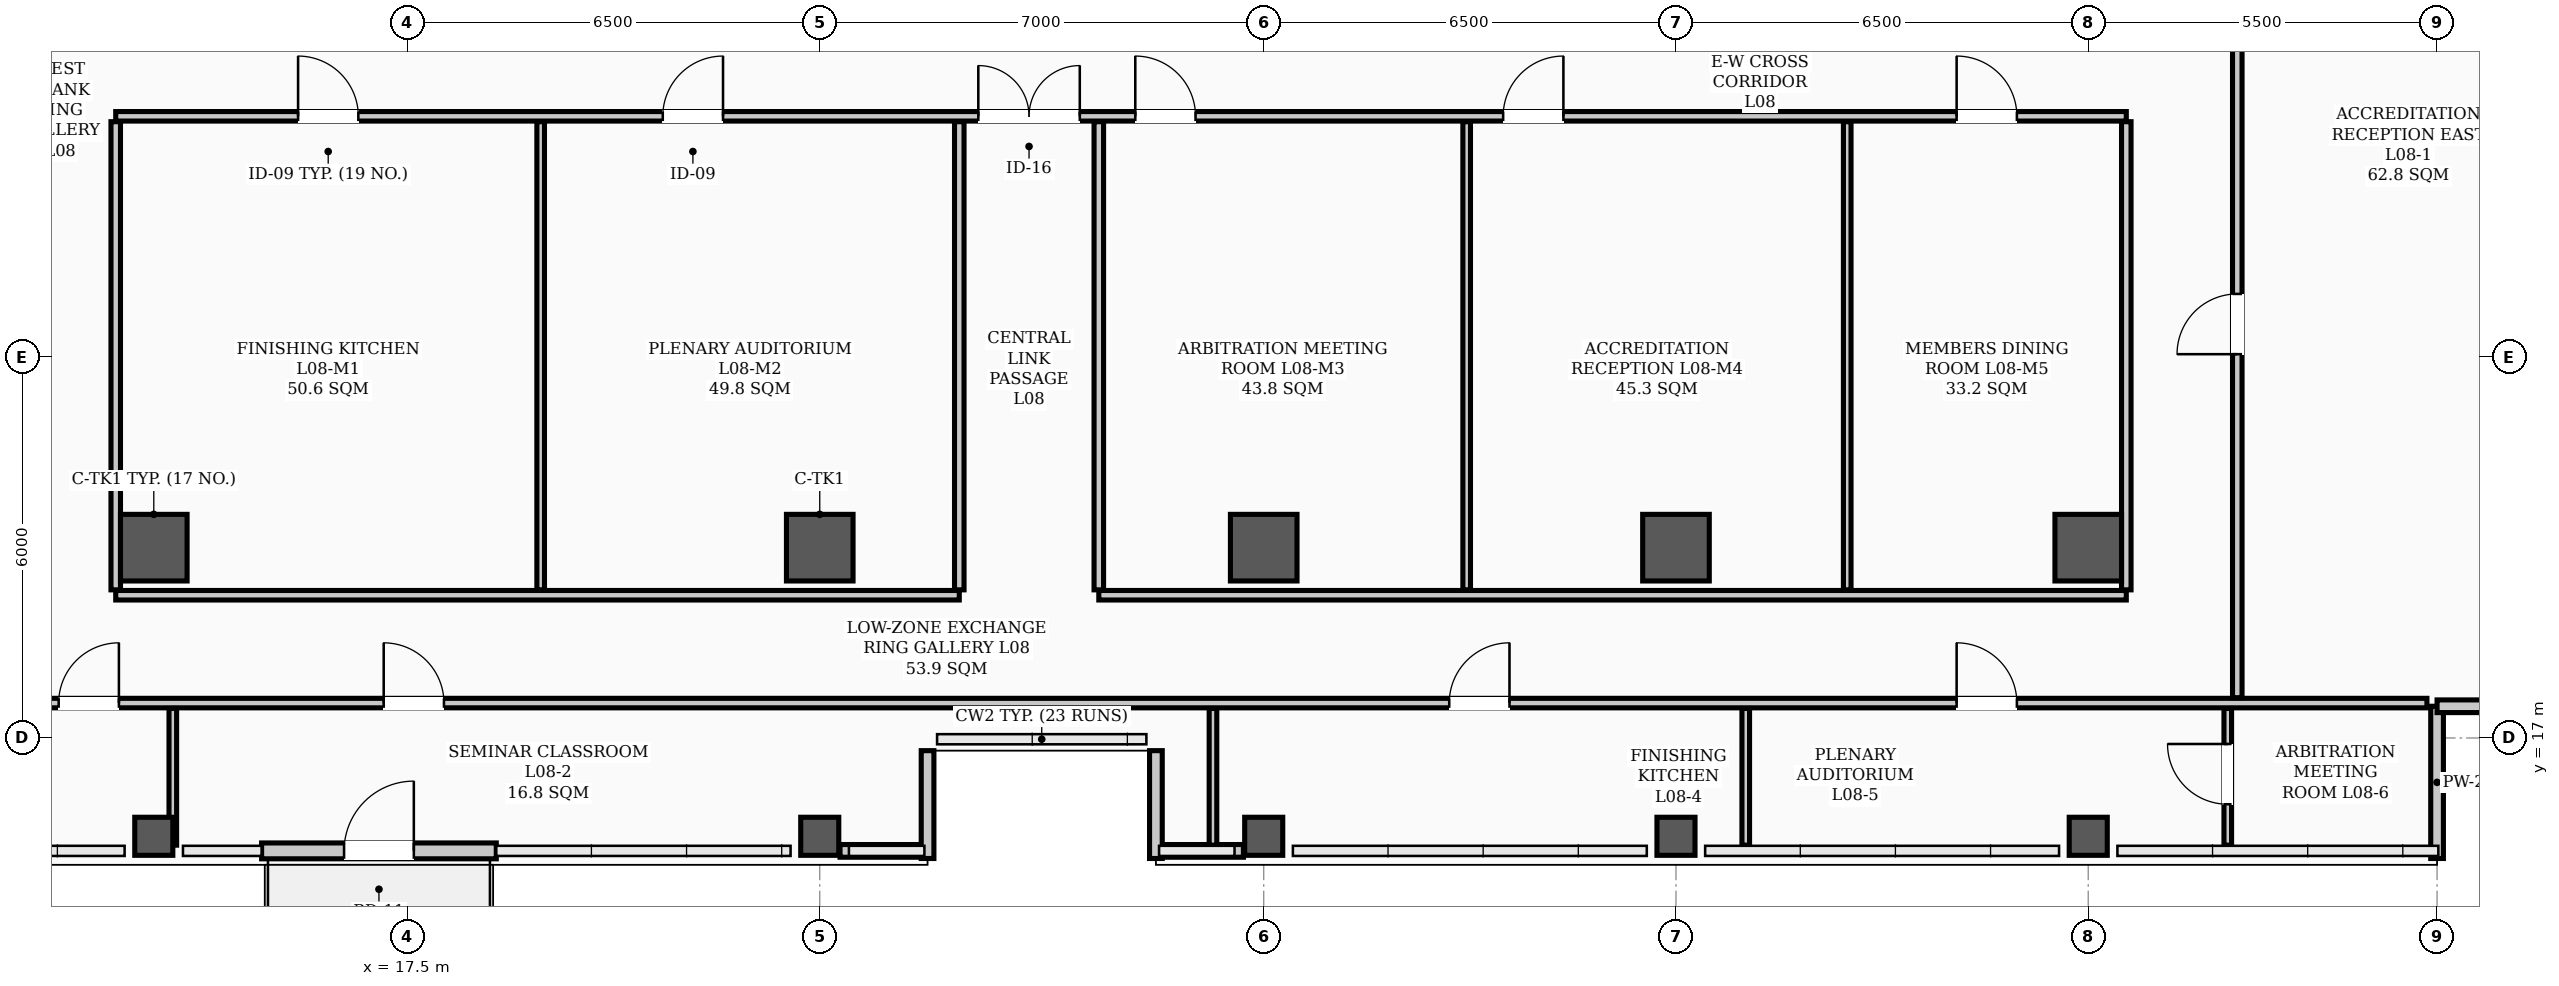
"""IFC4 building model, lengths in metres.
Left out: names, types, materials, properties, quantities, classifications, styles, units other than length and angle.
Written with IfcOpenShell. Run it as: python <this file> out.ifc"""

import sys

from ifc_helpers import new_model, si_unit, direction, frame, frame_2d, origin, origin_2d, place, context, subcontext, project, spatial, rectangle, hollow_rectangle, extrude, element, fill, save


model = new_model("IFC4")
c1 = context("Model", 3, precision=1e-05, world=origin(), true_north=direction((0.0, 1.0)))
c2 = subcontext(c1, "Body", "Model", "MODEL_VIEW")
j1 = project(units=[si_unit("LENGTHUNIT", "METRE"), si_unit("PLANEANGLEUNIT", "RADIAN")], contexts=[c1])
p1 = place(None, origin())
s1 = spatial("IfcSite", under=j1, at=p1, CompositionType="ELEMENT")
p2 = place(p1, origin())
s2 = spatial("IfcBuilding", under=s1, at=p2, CompositionType="ELEMENT")
p3 = place(p2, frame((0.0, 0.0, 34.3)))
s3 = spatial("IfcBuildingStorey", under=s2, at=p3, CompositionType="ELEMENT", Elevation=34.3)
for number, where, z_axis, x_axis in (
    (1, (13.5, 20.0, 0.0), (0.0, 0.0, 1.0), (1.0, 0.0, 0.0)),
    (2, (24.0, 20.0, 0.0), (0.0, 0.0, 1.0), (1.0, 0.0, 0.0)),
    (3, (31.0, 20.0, 0.0), (0.0, 0.0, 1.0), (1.0, 0.0, 0.0)),
    (4, (37.5, 20.0, 0.0), (0.0, 0.0, 1.0), (1.0, 0.0, 0.0)),
    (5, (44.0, 20.0, 0.0), (0.0, 0.0, 1.0), (1.0, 0.0, 0.0)),
):
    element("IfcColumn", number, at=place(p3, frame(where, z_axis=z_axis, x_axis=x_axis)), inside=s3, PredefinedType="COLUMN", context=c2, shape_type="SweptSolid", body=[
        extrude(hollow_rectangle(XDim=1.05, YDim=1.05, WallThickness=0.038, InnerFilletRadius=0.019, OuterFilletRadius=0.057, at=origin_2d()), origin(), (0.0, 0.0, 1.0), 3.9),
    ])
for number, where, z_axis, x_axis in (
    (6, (13.5, 15.45, 0.0), (0.0, 0.0, 1.0), (1.0, 0.0, 0.0)),
    (7, (24.0, 15.45, 0.0), (0.0, 0.0, 1.0), (1.0, 0.0, 0.0)),
    (8, (31.0, 15.45, 0.0), (0.0, 0.0, 1.0), (1.0, 0.0, 0.0)),
    (9, (37.5, 15.45, 0.0), (0.0, 0.0, 1.0), (1.0, 0.0, 0.0)),
    (10, (44.0, 15.45, 0.0), (0.0, 0.0, 1.0), (1.0, 0.0, 0.0)),
):
    element("IfcColumn", number, at=place(p3, frame(where, z_axis=z_axis, x_axis=x_axis)), inside=s3, PredefinedType="COLUMN", context=c2, shape_type="SweptSolid", body=[
        extrude(hollow_rectangle(XDim=0.6, YDim=0.6, WallThickness=0.026, InnerFilletRadius=0.013, OuterFilletRadius=0.039, at=origin_2d()), origin(), (0.0, 0.0, 1.0), 3.9),
    ])
for number, where, z_axis, x_axis in (
    (11, (24.32, 15.22, 0.0), (0.0, 0.0, 1.0), (1.0, 0.0, 0.0)),
    (12, (29.35, 15.22, 0.0), (0.0, 0.0, 1.0), (1.0, 0.0, 0.0)),
):
    element("IfcWall", number, at=place(p3, frame(where, z_axis=z_axis, x_axis=x_axis)), inside=s3, PredefinedType="PARAPET", context=c2, shape_type="SweptSolid", body=[
        extrude(rectangle(XDim=1.33, YDim=0.2, at=frame_2d((0.665, 0.0))), origin(), (0.0, 0.0, 1.0), 1.2),
    ])
for number, where, z_axis, x_axis in (
    (13, (49.5, 15.1, 0.0), (0.0, 0.0, 1.0), (0.0, 1.0, 0.0)),
    (14, (49.5, 17.5, 0.0), (0.0, 0.0, 1.0), (1.0, 0.0, 0.0)),
):
    element("IfcWall", number, at=place(p3, frame(where, z_axis=z_axis, x_axis=x_axis)), inside=s3, PredefinedType="PARAPET", context=c2, shape_type="SweptSolid", body=[
        extrude(rectangle(XDim=2.4, YDim=0.2, at=frame_2d((1.2, 0.0))), origin(), (0.0, 0.0, 1.0), 1.2),
    ])
for number, where, z_axis, x_axis in (
    (15, (25.7, 15.1, 0.0), (0.0, 0.0, 1.0), (0.0, 1.0, 0.0)),
    (16, (29.3, 16.8, 0.0), (0.0, 0.0, 1.0), (0.0, -1.0, 0.0)),
):
    element("IfcWall", number, at=place(p3, frame(where, z_axis=z_axis, x_axis=x_axis)), inside=s3, PredefinedType="PARAPET", context=c2, shape_type="SweptSolid", body=[
        extrude(rectangle(XDim=1.7, YDim=0.2, at=frame_2d((0.85, 0.0))), origin(), (0.0, 0.0, 1.0), 1.2),
    ])
p4 = place(p3, frame((15.2, 15.22, 0.0), z_axis=(0.0, 0.0, 1.0), x_axis=(1.0, 0.0, 0.0)))
e17 = element("IfcWall", 17, at=p4, inside=s3, PredefinedType="STANDARD", context=c2, shape_type="SweptSolid", body=[
    extrude(rectangle(XDim=3.7, YDim=0.25, at=frame_2d((1.85, 0.0))), origin(), (0.0, 0.0, 1.0), 3.18),
])
p5 = place(p4, frame((1.3, 0.0, 0.0)))
e18 = element("IfcOpeningElement", 18, at=p5, cuts=e17, PredefinedType="OPENING", context=c2, shape_type="SweptSolid", body=[
    extrude(rectangle(XDim=1.1, YDim=2.2, at=frame_2d((0.55, 1.1))), frame((0.0, 0.135, 0.0), z_axis=(0.0, -1.0, 0.0), x_axis=(1.0, 0.0, 0.0)), (0.0, 0.0, 1.0), 0.27),
])
p6 = place(p3, frame((12.9, 26.8, 0.0), z_axis=(0.0, 0.0, 1.0), x_axis=(1.0, 0.0, 0.0)))
e19 = element("IfcWall", 19, at=p6, inside=s3, PredefinedType="PARTITIONING", context=c2, shape_type="SweptSolid", body=[
    extrude(rectangle(XDim=31.7, YDim=0.15, at=frame_2d((15.85, 0.0))), origin(), (0.0, 0.0, 1.0), 3.1),
])
p7 = place(p6, frame((13.6, 0.0, 0.0)))
e20 = element("IfcOpeningElement", 20, at=p7, cuts=e19, PredefinedType="OPENING", context=c2, shape_type="SweptSolid", body=[
    extrude(rectangle(XDim=1.6, YDim=2.08, at=frame_2d((0.8, 1.04))), frame((0.0, 0.085, 0.0), z_axis=(0.0, -1.0, 0.0), x_axis=(1.0, 0.0, 0.0)), (0.0, 0.0, 1.0), 0.17),
])
p8 = place(p6, frame((2.875, 0.0, 0.0)))
e21 = element("IfcOpeningElement", 21, at=p8, cuts=e19, PredefinedType="OPENING", context=c2, shape_type="SweptSolid", body=[
    extrude(rectangle(XDim=0.95, YDim=2.08, at=frame_2d((0.475, 1.04))), frame((0.0, 0.085, 0.0), z_axis=(0.0, -1.0, 0.0), x_axis=(1.0, 0.0, 0.0)), (0.0, 0.0, 1.0), 0.17),
])
p9 = place(p6, frame((8.625, 0.0, 0.0)))
e22 = element("IfcOpeningElement", 22, at=p9, cuts=e19, PredefinedType="OPENING", context=c2, shape_type="SweptSolid", body=[
    extrude(rectangle(XDim=0.95, YDim=2.08, at=frame_2d((0.475, 1.04))), frame((0.0, 0.085, 0.0), z_axis=(0.0, -1.0, 0.0), x_axis=(1.0, 0.0, 0.0)), (0.0, 0.0, 1.0), 0.17),
])
p10 = place(p6, frame((16.075, 0.0, 0.0)))
e23 = element("IfcOpeningElement", 23, at=p10, cuts=e19, PredefinedType="OPENING", context=c2, shape_type="SweptSolid", body=[
    extrude(rectangle(XDim=0.95, YDim=2.08, at=frame_2d((0.475, 1.04))), frame((0.0, 0.085, 0.0), z_axis=(0.0, -1.0, 0.0), x_axis=(1.0, 0.0, 0.0)), (0.0, 0.0, 1.0), 0.17),
])
p11 = place(p6, frame((21.875, 0.0, 0.0)))
e24 = element("IfcOpeningElement", 24, at=p11, cuts=e19, PredefinedType="OPENING", context=c2, shape_type="SweptSolid", body=[
    extrude(rectangle(XDim=0.95, YDim=2.08, at=frame_2d((0.475, 1.04))), frame((0.0, 0.085, 0.0), z_axis=(0.0, -1.0, 0.0), x_axis=(1.0, 0.0, 0.0)), (0.0, 0.0, 1.0), 0.17),
])
p12 = place(p6, frame((29.025, 0.0, 0.0)))
e25 = element("IfcOpeningElement", 25, at=p12, cuts=e19, PredefinedType="OPENING", context=c2, shape_type="SweptSolid", body=[
    extrude(rectangle(XDim=0.95, YDim=2.08, at=frame_2d((0.475, 1.04))), frame((0.0, 0.085, 0.0), z_axis=(0.0, -1.0, 0.0), x_axis=(1.0, 0.0, 0.0)), (0.0, 0.0, 1.0), 0.17),
])
p13 = place(p3, frame((4.66, 17.55, 0.0), z_axis=(0.0, 0.0, 1.0), x_axis=(1.0, 0.0, 0.0)))
e26 = element("IfcWall", 26, at=p13, inside=s3, PredefinedType="PARTITIONING", context=c2, shape_type="SweptSolid", body=[
    extrude(rectangle(XDim=44.68, YDim=0.15, at=frame_2d((22.34, 0.0))), origin(), (0.0, 0.0, 1.0), 3.1),
])
p14 = place(p13, frame((7.34, 0.0, 0.0)))
e27 = element("IfcOpeningElement", 27, at=p14, cuts=e26, PredefinedType="OPENING", context=c2, shape_type="SweptSolid", body=[
    extrude(rectangle(XDim=0.95, YDim=2.08, at=frame_2d((0.475, 1.04))), frame((0.0, 0.085, 0.0), z_axis=(0.0, -1.0, 0.0), x_axis=(1.0, 0.0, 0.0)), (0.0, 0.0, 1.0), 0.17),
])
p15 = place(p13, frame((12.465, 0.0, 0.0)))
e28 = element("IfcOpeningElement", 28, at=p15, cuts=e26, PredefinedType="OPENING", context=c2, shape_type="SweptSolid", body=[
    extrude(rectangle(XDim=0.95, YDim=2.08, at=frame_2d((0.475, 1.04))), frame((0.0, 0.085, 0.0), z_axis=(0.0, -1.0, 0.0), x_axis=(1.0, 0.0, 0.0)), (0.0, 0.0, 1.0), 0.17),
])
p16 = place(p13, frame((29.265, 0.0, 0.0)))
e29 = element("IfcOpeningElement", 29, at=p16, cuts=e26, PredefinedType="OPENING", context=c2, shape_type="SweptSolid", body=[
    extrude(rectangle(XDim=0.95, YDim=2.08, at=frame_2d((0.475, 1.04))), frame((0.0, 0.085, 0.0), z_axis=(0.0, -1.0, 0.0), x_axis=(1.0, 0.0, 0.0)), (0.0, 0.0, 1.0), 0.17),
])
p17 = place(p13, frame((37.265, 0.0, 0.0)))
e30 = element("IfcOpeningElement", 30, at=p17, cuts=e26, PredefinedType="OPENING", context=c2, shape_type="SweptSolid", body=[
    extrude(rectangle(XDim=0.95, YDim=2.08, at=frame_2d((0.475, 1.04))), frame((0.0, 0.085, 0.0), z_axis=(0.0, -1.0, 0.0), x_axis=(1.0, 0.0, 0.0)), (0.0, 0.0, 1.0), 0.17),
])
p18 = place(p3, frame((12.9, 19.25, 0.0), z_axis=(0.0, 0.0, 1.0), x_axis=(1.0, 0.0, 0.0)))
e31 = element("IfcWall", 31, at=p18, inside=s3, PredefinedType="PARTITIONING", context=c2, shape_type="SweptSolid", body=[
    extrude(rectangle(XDim=13.3, YDim=0.15, at=frame_2d((6.65, 0.0))), origin(), (0.0, 0.0, 1.0), 3.1),
])
p19 = place(p3, frame((28.4, 19.25, 0.0), z_axis=(0.0, 0.0, 1.0), x_axis=(1.0, 0.0, 0.0)))
e32 = element("IfcWall", 32, at=p19, inside=s3, PredefinedType="PARTITIONING", context=c2, shape_type="SweptSolid", body=[
    extrude(rectangle(XDim=16.2, YDim=0.15, at=frame_2d((8.1, 0.0))), origin(), (0.0, 0.0, 1.0), 3.1),
])
for number, where, z_axis, x_axis in (
    (33, (26.2, 19.335, 0.0), (0.0, 0.0, 1.0), (0.0, 1.0, 0.0)),
    (34, (28.4, 19.335, 0.0), (0.0, 0.0, 1.0), (0.0, 1.0, 0.0)),
    (35, (12.9, 19.335, 0.0), (0.0, 0.0, 1.0), (0.0, 1.0, 0.0)),
):
    element("IfcWall", number, at=place(p3, frame(where, z_axis=z_axis, x_axis=x_axis)), inside=s3, PredefinedType="PARTITIONING", context=c2, shape_type="SweptSolid", body=[
        extrude(rectangle(XDim=7.38, YDim=0.15, at=frame_2d((3.69, 0.0))), origin(), (0.0, 0.0, 1.0), 3.0),
    ])
p20 = place(p3, frame((46.35, 17.635, 0.0), z_axis=(0.0, 0.0, 1.0), x_axis=(0.0, 1.0, 0.0)))
e36 = element("IfcWall", 36, at=p20, inside=s3, PredefinedType="PARTITIONING", context=c2, shape_type="SweptSolid", body=[
    extrude(rectangle(XDim=22.53, YDim=0.15, at=frame_2d((11.265, 0.0))), origin(), (0.0, 0.0, 1.0), 3.0),
])
p21 = place(p20, frame((5.415, 0.0, 0.0)))
e37 = element("IfcOpeningElement", 37, at=p21, cuts=e36, PredefinedType="OPENING", context=c2, shape_type="SweptSolid", body=[
    extrude(rectangle(XDim=0.95, YDim=2.08, at=frame_2d((0.475, 1.04))), frame((0.0, 0.085, 0.0), z_axis=(0.0, -1.0, 0.0), x_axis=(1.0, 0.0, 0.0)), (0.0, 0.0, 1.0), 0.17),
])
p22 = place(p20, frame((16.765, 0.0, 0.0)))
e38 = element("IfcOpeningElement", 38, at=p22, cuts=e36, PredefinedType="OPENING", context=c2, shape_type="SweptSolid", body=[
    extrude(rectangle(XDim=0.95, YDim=2.08, at=frame_2d((0.475, 1.04))), frame((0.0, 0.085, 0.0), z_axis=(0.0, -1.0, 0.0), x_axis=(1.0, 0.0, 0.0)), (0.0, 0.0, 1.0), 0.17),
])
p23 = place(p3, frame((44.6, 19.335, 0.0), z_axis=(0.0, 0.0, 1.0), x_axis=(0.0, 1.0, 0.0)))
e39 = element("IfcWall", 39, at=p23, inside=s3, PredefinedType="PARTITIONING", context=c2, shape_type="SweptSolid", body=[
    extrude(rectangle(XDim=7.38, YDim=0.15, at=frame_2d((3.69, 0.0))), origin(), (0.0, 0.0, 1.0), 3.0),
])
p24 = place(p3, frame((13.8, 15.31, 0.0), z_axis=(0.0, 0.0, 1.0), x_axis=(0.0, 1.0, 0.0)))
e40 = element("IfcWall", 40, at=p24, inside=s3, PredefinedType="PARTITIONING", context=c2, shape_type="SweptSolid", body=[
    extrude(rectangle(XDim=2.155, YDim=0.12, at=frame_2d((1.078, 0.0))), origin(), (0.0, 0.0, 1.0), 3.1),
])
for number, where, z_axis, x_axis in (
    (41, (30.2, 15.31, 0.0), (0.0, 0.0, 1.0), (0.0, 1.0, 0.0)),
    (42, (38.6, 15.31, 0.0), (0.0, 0.0, 1.0), (0.0, 1.0, 0.0)),
):
    element("IfcWall", number, at=place(p3, frame(where, z_axis=z_axis, x_axis=x_axis)), inside=s3, PredefinedType="PARTITIONING", context=c2, shape_type="SweptSolid", body=[
        extrude(rectangle(XDim=2.155, YDim=0.12, at=frame_2d((1.078, 0.0))), origin(), (0.0, 0.0, 1.0), 3.212),
    ])
p25 = place(p3, frame((46.2, 15.31, 0.0), z_axis=(0.0, 0.0, 1.0), x_axis=(0.0, 1.0, 0.0)))
e43 = element("IfcWall", 43, at=p25, inside=s3, PredefinedType="PARTITIONING", context=c2, shape_type="SweptSolid", body=[
    extrude(rectangle(XDim=2.155, YDim=0.12, at=frame_2d((1.078, 0.0))), origin(), (0.0, 0.0, 1.0), 3.72),
])
p26 = place(p25, frame((0.645, 0.0, 0.0)))
e44 = element("IfcOpeningElement", 44, at=p26, cuts=e43, PredefinedType="OPENING", context=c2, shape_type="SweptSolid", body=[
    extrude(rectangle(XDim=0.95, YDim=2.08, at=frame_2d((0.475, 1.04))), frame((0.0, 0.07, 0.0), z_axis=(0.0, -1.0, 0.0), x_axis=(1.0, 0.0, 0.0)), (0.0, 0.0, 1.0), 0.14),
])
for number, where, z_axis, x_axis in (
    (45, (19.6, 19.335, 0.0), (0.0, 0.0, 1.0), (0.0, 1.0, 0.0)),
    (46, (34.2, 19.335, 0.0), (0.0, 0.0, 1.0), (0.0, 1.0, 0.0)),
    (47, (40.2, 19.335, 0.0), (0.0, 0.0, 1.0), (0.0, 1.0, 0.0)),
):
    element("IfcWall", number, at=place(p3, frame(where, z_axis=z_axis, x_axis=x_axis)), inside=s3, PredefinedType="PARTITIONING", context=c2, shape_type="SweptSolid", body=[
        extrude(rectangle(XDim=7.38, YDim=0.12, at=frame_2d((3.69, 0.0))), origin(), (0.0, 0.0, 1.0), 3.0),
    ])
p27 = place(p5, origin())
e48 = element("IfcDoor", 48, at=p27, inside=s3, OperationType="SINGLE_SWING_RIGHT", PredefinedType="DOOR", context=c2, shape_type="SweptSolid", body=[
    extrude(rectangle(XDim=1.1, YDim=2.2, at=frame_2d((0.55, 1.1))), frame((0.0, 0.025, 0.0), z_axis=(0.0, -1.0, 0.0), x_axis=(1.0, 0.0, 0.0)), (0.0, 0.0, 1.0), 0.05),
])
fill(e18, e48)
p28 = place(p7, origin())
e49 = element("IfcDoor", 49, at=p28, inside=s3, OperationType="DOUBLE_DOOR_SINGLE_SWING", PredefinedType="DOOR", context=c2, shape_type="SweptSolid", body=[
    extrude(rectangle(XDim=1.6, YDim=2.08, at=frame_2d((0.8, 1.04))), frame((0.0, 0.025, 0.0), z_axis=(0.0, -1.0, 0.0), x_axis=(1.0, 0.0, 0.0)), (0.0, 0.0, 1.0), 0.05),
])
fill(e20, e49)
p29 = place(p14, origin())
e50 = element("IfcDoor", 50, at=p29, inside=s3, OperationType="SINGLE_SWING_RIGHT", PredefinedType="DOOR", context=c2, shape_type="SweptSolid", body=[
    extrude(rectangle(XDim=0.95, YDim=2.08, at=frame_2d((0.475, 1.04))), frame((0.0, 0.025, 0.0), z_axis=(0.0, -1.0, 0.0), x_axis=(1.0, 0.0, 0.0)), (0.0, 0.0, 1.0), 0.05),
])
fill(e27, e50)
p30 = place(p15, origin())
e51 = element("IfcDoor", 51, at=p30, inside=s3, OperationType="SINGLE_SWING_LEFT", PredefinedType="DOOR", context=c2, shape_type="SweptSolid", body=[
    extrude(rectangle(XDim=0.95, YDim=2.08, at=frame_2d((0.475, 1.04))), frame((0.0, 0.025, 0.0), z_axis=(0.0, -1.0, 0.0), x_axis=(1.0, 0.0, 0.0)), (0.0, 0.0, 1.0), 0.05),
])
fill(e28, e51)
p31 = place(p16, origin())
e52 = element("IfcDoor", 52, at=p31, inside=s3, OperationType="SINGLE_SWING_RIGHT", PredefinedType="DOOR", context=c2, shape_type="SweptSolid", body=[
    extrude(rectangle(XDim=0.95, YDim=2.08, at=frame_2d((0.475, 1.04))), frame((0.0, 0.025, 0.0), z_axis=(0.0, -1.0, 0.0), x_axis=(1.0, 0.0, 0.0)), (0.0, 0.0, 1.0), 0.05),
])
fill(e29, e52)
p32 = place(p17, origin())
e53 = element("IfcDoor", 53, at=p32, inside=s3, OperationType="SINGLE_SWING_LEFT", PredefinedType="DOOR", context=c2, shape_type="SweptSolid", body=[
    extrude(rectangle(XDim=0.95, YDim=2.08, at=frame_2d((0.475, 1.04))), frame((0.0, 0.025, 0.0), z_axis=(0.0, -1.0, 0.0), x_axis=(1.0, 0.0, 0.0)), (0.0, 0.0, 1.0), 0.05),
])
fill(e30, e53)
p33 = place(p26, origin())
e54 = element("IfcDoor", 54, at=p33, inside=s3, OperationType="SINGLE_SWING_RIGHT", PredefinedType="DOOR", context=c2, shape_type="SweptSolid", body=[
    extrude(rectangle(XDim=0.95, YDim=2.08, at=frame_2d((0.475, 1.04))), frame((0.0, 0.025, 0.0), z_axis=(0.0, -1.0, 0.0), x_axis=(1.0, 0.0, 0.0)), (0.0, 0.0, 1.0), 0.05),
])
fill(e44, e54)
p34 = place(p8, origin())
e55 = element("IfcDoor", 55, at=p34, inside=s3, OperationType="SINGLE_SWING_LEFT", PredefinedType="DOOR", context=c2, shape_type="SweptSolid", body=[
    extrude(rectangle(XDim=0.95, YDim=2.08, at=frame_2d((0.475, 1.04))), frame((0.0, 0.025, 0.0), z_axis=(0.0, -1.0, 0.0), x_axis=(1.0, 0.0, 0.0)), (0.0, 0.0, 1.0), 0.05),
])
fill(e21, e55)
p35 = place(p9, origin())
e56 = element("IfcDoor", 56, at=p35, inside=s3, OperationType="SINGLE_SWING_RIGHT", PredefinedType="DOOR", context=c2, shape_type="SweptSolid", body=[
    extrude(rectangle(XDim=0.95, YDim=2.08, at=frame_2d((0.475, 1.04))), frame((0.0, 0.025, 0.0), z_axis=(0.0, -1.0, 0.0), x_axis=(1.0, 0.0, 0.0)), (0.0, 0.0, 1.0), 0.05),
])
fill(e22, e56)
p36 = place(p10, origin())
e57 = element("IfcDoor", 57, at=p36, inside=s3, OperationType="SINGLE_SWING_LEFT", PredefinedType="DOOR", context=c2, shape_type="SweptSolid", body=[
    extrude(rectangle(XDim=0.95, YDim=2.08, at=frame_2d((0.475, 1.04))), frame((0.0, 0.025, 0.0), z_axis=(0.0, -1.0, 0.0), x_axis=(1.0, 0.0, 0.0)), (0.0, 0.0, 1.0), 0.05),
])
fill(e23, e57)
p37 = place(p11, origin())
e58 = element("IfcDoor", 58, at=p37, inside=s3, OperationType="SINGLE_SWING_RIGHT", PredefinedType="DOOR", context=c2, shape_type="SweptSolid", body=[
    extrude(rectangle(XDim=0.95, YDim=2.08, at=frame_2d((0.475, 1.04))), frame((0.0, 0.025, 0.0), z_axis=(0.0, -1.0, 0.0), x_axis=(1.0, 0.0, 0.0)), (0.0, 0.0, 1.0), 0.05),
])
fill(e24, e58)
p38 = place(p12, origin())
e59 = element("IfcDoor", 59, at=p38, inside=s3, OperationType="SINGLE_SWING_LEFT", PredefinedType="DOOR", context=c2, shape_type="SweptSolid", body=[
    extrude(rectangle(XDim=0.95, YDim=2.08, at=frame_2d((0.475, 1.04))), frame((0.0, 0.025, 0.0), z_axis=(0.0, -1.0, 0.0), x_axis=(1.0, 0.0, 0.0)), (0.0, 0.0, 1.0), 0.05),
])
fill(e25, e59)
p39 = place(p21, origin())
e60 = element("IfcDoor", 60, at=p39, inside=s3, OperationType="SINGLE_SWING_LEFT", PredefinedType="DOOR", context=c2, shape_type="SweptSolid", body=[
    extrude(rectangle(XDim=0.95, YDim=2.08, at=frame_2d((0.475, 1.04))), frame((0.0, 0.025, 0.0), z_axis=(0.0, -1.0, 0.0), x_axis=(1.0, 0.0, 0.0)), (0.0, 0.0, 1.0), 0.05),
])
fill(e37, e60)
save(model, sys.argv[1])
